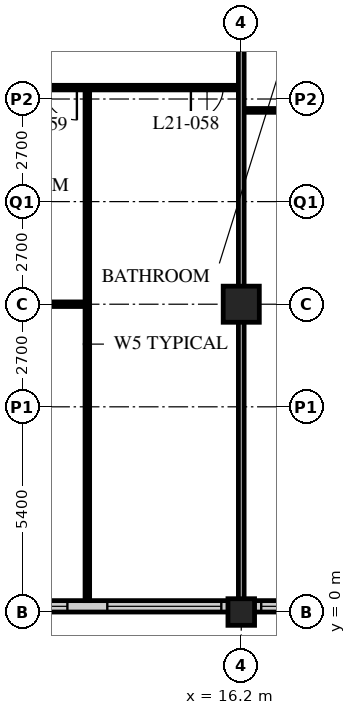
"""IFC4 building model, lengths in metres.
Left out: names, types, materials, properties, quantities, classifications, styles, units other than length and angle.
Written with IfcOpenShell. Run it as: python <this file> out.ifc"""

import sys

from ifc_helpers import new_model, si_unit, direction, frame, frame_2d, origin, origin_2d, place, context, subcontext, project, spatial, rectangle, hollow_rectangle, extrude, element, fill, save


model = new_model("IFC4")
c1 = context("Model", 3, precision=1e-05, world=origin(), true_north=direction((0.0, 1.0)))
c2 = subcontext(c1, "Body", "Model", "MODEL_VIEW")
j1 = project(units=[si_unit("LENGTHUNIT", "METRE"), si_unit("PLANEANGLEUNIT", "RADIAN")], contexts=[c1])
p1 = place(None, origin())
s1 = spatial("IfcSite", under=j1, at=p1, CompositionType="ELEMENT")
p2 = place(p1, origin())
s2 = spatial("IfcBuilding", under=s1, at=p2, CompositionType="ELEMENT")
p3 = place(p2, frame((0.0, 0.0, 84.0)))
s3 = spatial("IfcBuildingStorey", under=s2, at=p3, CompositionType="ELEMENT", Elevation=84.0)
p4 = place(p3, frame((16.2, 0.0, 0.0), z_axis=(0.0, 0.0, 1.0), x_axis=(1.0, 0.0, 0.0)))
e1 = element("IfcColumn", 1, at=p4, inside=s3, PredefinedType="COLUMN", context=c2, shape_type="SweptSolid", body=[
    extrude(hollow_rectangle(XDim=0.7, YDim=0.7, WallThickness=0.06, at=origin_2d()), origin(), (0.0, 0.0, 1.0), 3.4),
])
p5 = place(p3, frame((16.2, 8.1, 0.0), z_axis=(0.0, 0.0, 1.0), x_axis=(1.0, 0.0, 0.0)))
e2 = element("IfcColumn", 2, at=p5, inside=s3, PredefinedType="COLUMN", context=c2, shape_type="SweptSolid", body=[
    extrude(hollow_rectangle(XDim=0.95, YDim=0.95, WallThickness=0.095, at=origin_2d()), origin(), (0.0, 0.0, 1.0), 3.4),
])
p6 = place(p3, frame((8.4, 0.15, 0.0), z_axis=(0.0, 0.0, 1.0), x_axis=(1.0, 0.0, 0.0)))
e3 = element("IfcWall", 3, at=p6, inside=s3, PredefinedType="SOLIDWALL", context=c2, shape_type="SweptSolid", body=[
    extrude(rectangle(XDim=40.2, YDim=0.3, at=frame_2d((20.1, 0.0))), origin(), (0.0, 0.0, 1.0), 3.19),
])
p7 = place(p6, frame((0.225, 0.0, 0.9)))
e4 = element("IfcOpeningElement", 4, at=p7, cuts=e3, PredefinedType="OPENING", context=c2, shape_type="SweptSolid", body=[
    extrude(rectangle(XDim=3.0, YDim=1.5, at=frame_2d((1.5, 0.75))), frame((0.0, 0.16, 0.0), z_axis=(0.0, -1.0, 0.0), x_axis=(1.0, 0.0, 0.0)), (0.0, 0.0, 1.0), 0.32),
])
p8 = place(p6, frame((4.275, 0.0, 0.9)))
e5 = element("IfcOpeningElement", 5, at=p8, cuts=e3, PredefinedType="OPENING", context=c2, shape_type="SweptSolid", body=[
    extrude(rectangle(XDim=3.0, YDim=1.5, at=frame_2d((1.5, 0.75))), frame((0.0, 0.16, 0.0), z_axis=(0.0, -1.0, 0.0), x_axis=(1.0, 0.0, 0.0)), (0.0, 0.0, 1.0), 0.32),
])
p9 = place(p6, frame((8.325, 0.0, 0.9)))
e6 = element("IfcOpeningElement", 6, at=p9, cuts=e3, PredefinedType="OPENING", context=c2, shape_type="SweptSolid", body=[
    extrude(rectangle(XDim=3.0, YDim=1.5, at=frame_2d((1.5, 0.75))), frame((0.0, 0.16, 0.0), z_axis=(0.0, -1.0, 0.0), x_axis=(1.0, 0.0, 0.0)), (0.0, 0.0, 1.0), 0.32),
])
p10 = place(p6, frame((12.375, 0.0, 0.9)))
e7 = element("IfcOpeningElement", 7, at=p10, cuts=e3, PredefinedType="OPENING", context=c2, shape_type="SweptSolid", body=[
    extrude(rectangle(XDim=3.0, YDim=1.5, at=frame_2d((1.5, 0.75))), frame((0.0, 0.16, 0.0), z_axis=(0.0, -1.0, 0.0), x_axis=(1.0, 0.0, 0.0)), (0.0, 0.0, 1.0), 0.32),
])
p11 = place(p6, frame((16.425, 0.0, 0.9)))
e8 = element("IfcOpeningElement", 8, at=p11, cuts=e3, PredefinedType="OPENING", context=c2, shape_type="SweptSolid", body=[
    extrude(rectangle(XDim=3.0, YDim=1.5, at=frame_2d((1.5, 0.75))), frame((0.0, 0.16, 0.0), z_axis=(0.0, -1.0, 0.0), x_axis=(1.0, 0.0, 0.0)), (0.0, 0.0, 1.0), 0.32),
])
p12 = place(p6, frame((20.475, 0.0, 0.9)))
e9 = element("IfcOpeningElement", 9, at=p12, cuts=e3, PredefinedType="OPENING", context=c2, shape_type="SweptSolid", body=[
    extrude(rectangle(XDim=3.0, YDim=1.5, at=frame_2d((1.5, 0.75))), frame((0.0, 0.16, 0.0), z_axis=(0.0, -1.0, 0.0), x_axis=(1.0, 0.0, 0.0)), (0.0, 0.0, 1.0), 0.32),
])
p13 = place(p6, frame((24.525, 0.0, 0.9)))
e10 = element("IfcOpeningElement", 10, at=p13, cuts=e3, PredefinedType="OPENING", context=c2, shape_type="SweptSolid", body=[
    extrude(rectangle(XDim=3.0, YDim=1.5, at=frame_2d((1.5, 0.75))), frame((0.0, 0.16, 0.0), z_axis=(0.0, -1.0, 0.0), x_axis=(1.0, 0.0, 0.0)), (0.0, 0.0, 1.0), 0.32),
])
p14 = place(p6, frame((28.575, 0.0, 0.9)))
e11 = element("IfcOpeningElement", 11, at=p14, cuts=e3, PredefinedType="OPENING", context=c2, shape_type="SweptSolid", body=[
    extrude(rectangle(XDim=3.0, YDim=1.5, at=frame_2d((1.5, 0.75))), frame((0.0, 0.16, 0.0), z_axis=(0.0, -1.0, 0.0), x_axis=(1.0, 0.0, 0.0)), (0.0, 0.0, 1.0), 0.32),
])
p15 = place(p6, frame((32.625, 0.0, 0.9)))
e12 = element("IfcOpeningElement", 12, at=p15, cuts=e3, PredefinedType="OPENING", context=c2, shape_type="SweptSolid", body=[
    extrude(rectangle(XDim=3.0, YDim=1.5, at=frame_2d((1.5, 0.75))), frame((0.0, 0.16, 0.0), z_axis=(0.0, -1.0, 0.0), x_axis=(1.0, 0.0, 0.0)), (0.0, 0.0, 1.0), 0.32),
])
p16 = place(p6, frame((36.675, 0.0, 0.9)))
e13 = element("IfcOpeningElement", 13, at=p16, cuts=e3, PredefinedType="OPENING", context=c2, shape_type="SweptSolid", body=[
    extrude(rectangle(XDim=3.0, YDim=1.5, at=frame_2d((1.5, 0.75))), frame((0.0, 0.16, 0.0), z_axis=(0.0, -1.0, 0.0), x_axis=(1.0, 0.0, 0.0)), (0.0, 0.0, 1.0), 0.32),
])
p17 = place(p3, frame((16.2, 13.2, 0.0), z_axis=(0.0, 0.0, 1.0), x_axis=(1.0, 0.0, 0.0)))
e14 = element("IfcWall", 14, at=p17, inside=s3, PredefinedType="PARTITIONING", context=c2, shape_type="SweptSolid", body=[
    extrude(rectangle(XDim=2.3, YDim=0.1, at=frame_2d((1.15, 0.0))), origin(), (0.0, 0.0, 1.0), 3.19),
])
p18 = place(p3, frame((8.15, 13.8, 0.0), z_axis=(0.0, 0.0, 1.0), x_axis=(1.0, 0.0, 0.0)))
e15 = element("IfcWall", 15, at=p18, inside=s3, PredefinedType="PARTITIONING", context=c2, shape_type="SweptSolid", body=[
    extrude(rectangle(XDim=8.05, YDim=0.12, at=frame_2d((4.025, 0.0))), origin(), (0.0, 0.0, 1.0), 3.19),
])
p19 = place(p18, frame((6.725, 0.0, 0.0)))
e16 = element("IfcOpeningElement", 16, at=p19, cuts=e15, PredefinedType="OPENING", context=c2, shape_type="SweptSolid", body=[
    extrude(rectangle(XDim=0.85, YDim=2.1, at=frame_2d((0.425, 1.05))), frame((0.0, 0.07, 0.0), z_axis=(0.0, -1.0, 0.0), x_axis=(1.0, 0.0, 0.0)), (0.0, 0.0, 1.0), 0.14),
])
p20 = place(p18, frame((2.875, 0.0, 0.0)))
e17 = element("IfcOpeningElement", 17, at=p20, cuts=e15, PredefinedType="OPENING", context=c2, shape_type="SweptSolid", body=[
    extrude(rectangle(XDim=0.85, YDim=2.1, at=frame_2d((0.425, 1.05))), frame((0.0, 0.07, 0.0), z_axis=(0.0, -1.0, 0.0), x_axis=(1.0, 0.0, 0.0)), (0.0, 0.0, 1.0), 0.14),
])
p21 = place(p3, frame((12.15, 13.8, 0.0), z_axis=(0.0, 0.0, 1.0), x_axis=(0.0, -1.0, 0.0)))
e18 = element("IfcWall", 18, at=p21, inside=s3, PredefinedType="PARTITIONING", context=c2, shape_type="SweptSolid", body=[
    extrude(rectangle(XDim=13.5, YDim=0.12, at=frame_2d((6.75, 0.0))), origin(), (0.0, 0.0, 1.0), 3.19),
])
p22 = place(p3, frame((16.2, 16.2, 0.0), z_axis=(0.0, 0.0, 1.0), x_axis=(0.0, -1.0, 0.0)))
e19 = element("IfcWall", 19, at=p22, inside=s3, PredefinedType="PARTITIONING", context=c2, shape_type="SweptSolid", body=[
    extrude(rectangle(XDim=15.9, YDim=0.15, at=frame_2d((7.95, 0.0))), origin(), (0.0, 0.0, 1.0), 2.428),
])
p23 = place(p3, frame((12.15, 8.1, 0.0), z_axis=(0.0, 0.0, 1.0), x_axis=(-1.0, 0.0, 0.0)))
e20 = element("IfcWall", 20, at=p23, inside=s3, PredefinedType="PARTITIONING", context=c2, shape_type="SweptSolid", body=[
    extrude(rectangle(XDim=3.575, YDim=0.12, at=frame_2d((1.788, 0.0))), origin(), (0.0, 0.0, 1.0), 2.428),
])
p24 = place(p7, origin())
e21 = element("IfcWindow", 21, at=p24, inside=s3, PartitioningType="SINGLE_PANEL", PredefinedType="WINDOW", context=c2, shape_type="SweptSolid", body=[
    extrude(rectangle(XDim=3.0, YDim=1.5, at=frame_2d((1.5, 0.75))), frame((0.0, 0.03, 0.0), z_axis=(0.0, -1.0, 0.0), x_axis=(1.0, 0.0, 0.0)), (0.0, 0.0, 1.0), 0.06),
])
fill(e4, e21)
p25 = place(p8, origin())
e22 = element("IfcWindow", 22, at=p25, inside=s3, PartitioningType="SINGLE_PANEL", PredefinedType="WINDOW", context=c2, shape_type="SweptSolid", body=[
    extrude(rectangle(XDim=3.0, YDim=1.5, at=frame_2d((1.5, 0.75))), frame((0.0, 0.03, 0.0), z_axis=(0.0, -1.0, 0.0), x_axis=(1.0, 0.0, 0.0)), (0.0, 0.0, 1.0), 0.06),
])
fill(e5, e22)
p26 = place(p9, origin())
e23 = element("IfcWindow", 23, at=p26, inside=s3, PartitioningType="SINGLE_PANEL", PredefinedType="WINDOW", context=c2, shape_type="SweptSolid", body=[
    extrude(rectangle(XDim=3.0, YDim=1.5, at=frame_2d((1.5, 0.75))), frame((0.0, 0.03, 0.0), z_axis=(0.0, -1.0, 0.0), x_axis=(1.0, 0.0, 0.0)), (0.0, 0.0, 1.0), 0.06),
])
fill(e6, e23)
p27 = place(p19, origin())
e24 = element("IfcDoor", 24, at=p27, inside=s3, OperationType="SINGLE_SWING_RIGHT", PredefinedType="DOOR", context=c2, shape_type="SweptSolid", body=[
    extrude(rectangle(XDim=0.85, YDim=2.1, at=frame_2d((0.425, 1.05))), frame((0.0, 0.025, 0.0), z_axis=(0.0, -1.0, 0.0), x_axis=(1.0, 0.0, 0.0)), (0.0, 0.0, 1.0), 0.05),
])
fill(e16, e24)
p28 = place(p20, origin())
e25 = element("IfcDoor", 25, at=p28, inside=s3, OperationType="SINGLE_SWING_LEFT", PredefinedType="DOOR", context=c2, shape_type="SweptSolid", body=[
    extrude(rectangle(XDim=0.85, YDim=2.1, at=frame_2d((0.425, 1.05))), frame((0.0, 0.025, 0.0), z_axis=(0.0, -1.0, 0.0), x_axis=(1.0, 0.0, 0.0)), (0.0, 0.0, 1.0), 0.05),
])
fill(e17, e25)
save(model, sys.argv[1])
